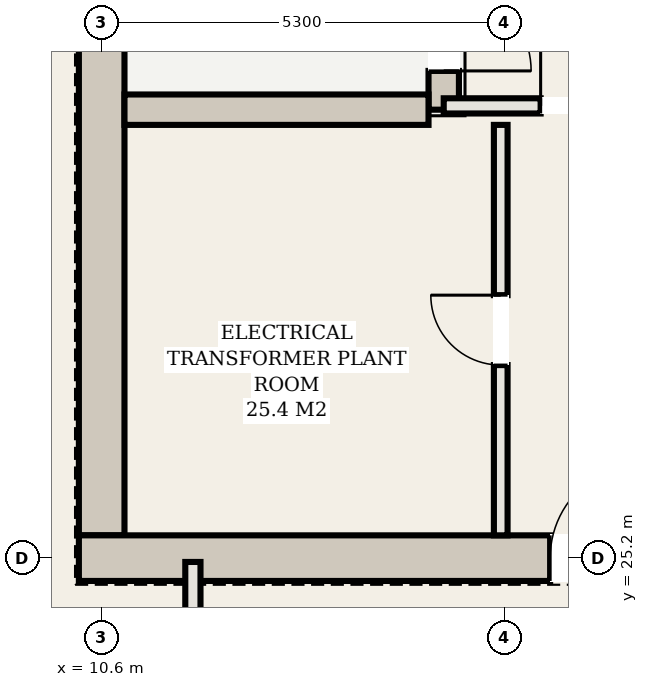
"""IFC4 building model, lengths in metres.
Left out: names, types, materials, properties, quantities, classifications, styles, units other than length and angle.
Written with IfcOpenShell. Run it as: python <this file> out.ifc"""

import sys

from ifc_helpers import new_model, si_unit, direction, frame, frame_2d, origin, place, context, subcontext, project, spatial, rectangle, extrude, element, fill, save


model = new_model("IFC4")
c1 = context("Model", 3, precision=1e-05, world=origin(), true_north=direction((0.0, 1.0)))
c2 = subcontext(c1, "Body", "Model", "MODEL_VIEW")
j1 = project(units=[si_unit("LENGTHUNIT", "METRE"), si_unit("PLANEANGLEUNIT", "RADIAN")], contexts=[c1])
p1 = place(None, origin())
s1 = spatial("IfcSite", under=j1, at=p1, CompositionType="ELEMENT")
p2 = place(p1, origin())
s2 = spatial("IfcBuilding", under=s1, at=p2, CompositionType="ELEMENT")
p3 = place(p2, frame((0.0, 0.0, 185.4)))
s3 = spatial("IfcBuildingStorey", under=s2, at=p3, CompositionType="ELEMENT", Elevation=185.4)
p4 = place(p3, frame((10.6, 25.5, 0.0), z_axis=(0.0, 0.0, 1.0), x_axis=(0.0, 1.0, 0.0)))
e1 = element("IfcWall", 1, at=p4, inside=s3, PredefinedType="SHEAR", context=c2, shape_type="SweptSolid", body=[
    extrude(rectangle(XDim=14.2, YDim=0.6, at=frame_2d((7.1, 0.0))), origin(), (0.0, 0.0, 1.0), 6.56),
])
p5 = place(p3, frame((10.3, 25.2, 0.0), z_axis=(0.0, 0.0, 1.0), x_axis=(1.0, 0.0, 0.0)))
e2 = element("IfcWall", 2, at=p5, inside=s3, PredefinedType="SHEAR", context=c2, shape_type="SweptSolid", body=[
    extrude(rectangle(XDim=8.1, YDim=0.6, at=frame_2d((4.05, 0.0))), origin(), (0.0, 0.0, 1.0), 6.56),
])
p6 = place(p5, frame((6.2, 0.0, 0.0)))
e3 = element("IfcOpeningElement", 3, at=p6, cuts=e2, PredefinedType="OPENING", context=c2, shape_type="SweptSolid", body=[
    extrude(rectangle(XDim=1.25, YDim=2.2, at=frame_2d((0.625, 1.1))), frame((0.0, 0.31, 0.0), z_axis=(0.0, -1.0, 0.0), x_axis=(1.0, 0.0, 0.0)), (0.0, 0.0, 1.0), 0.62),
])
p7 = place(p3, frame((15.1, 31.1, 0.0), z_axis=(0.0, 0.0, 1.0), x_axis=(0.0, 1.0, 0.0)))
e4 = element("IfcWall", 4, at=p7, inside=s3, PredefinedType="SHEAR", context=c2, shape_type="SweptSolid", body=[
    extrude(rectangle(XDim=8.6, YDim=0.4, at=frame_2d((4.3, 0.0))), origin(), (0.0, 0.0, 1.0), 6.56),
])
p8 = place(p7, frame((0.51, 0.0, 0.0)))
e5 = element("IfcOpeningElement", 5, at=p8, cuts=e4, PredefinedType="OPENING", context=c2, shape_type="SweptSolid", body=[
    extrude(rectangle(XDim=1.15, YDim=2.2, at=frame_2d((0.575, 1.1))), frame((0.0, 0.21, 0.0), z_axis=(0.0, -1.0, 0.0), x_axis=(1.0, 0.0, 0.0)), (0.0, 0.0, 1.0), 0.42),
])
p9 = place(p3, frame((10.9, 31.1, 0.0), z_axis=(0.0, 0.0, 1.0), x_axis=(1.0, 0.0, 0.0)))
e6 = element("IfcWall", 6, at=p9, inside=s3, PredefinedType="SHEAR", context=c2, shape_type="SweptSolid", body=[
    extrude(rectangle(XDim=4.0, YDim=0.4, at=frame_2d((2.0, 0.0))), origin(), (0.0, 0.0, 1.0), 6.56),
])
p10 = place(p3, frame((15.1, 31.15, 0.0), z_axis=(0.0, 0.0, 1.0), x_axis=(1.0, 0.0, 0.0)))
e7 = element("IfcWall", 7, at=p10, inside=s3, PredefinedType="PARTITIONING", context=c2, shape_type="SweptSolid", body=[
    extrude(rectangle(XDim=3.25, YDim=0.2, at=frame_2d((1.625, 0.0))), origin(), (0.0, 0.0, 1.0), 6.56),
])
p11 = place(p10, frame((1.275, 0.0, 0.0)))
e8 = element("IfcOpeningElement", 8, at=p11, cuts=e7, PredefinedType="OPENING", context=c2, shape_type="SweptSolid", body=[
    extrude(rectangle(XDim=1.25, YDim=2.2, at=frame_2d((0.625, 1.1))), frame((0.0, 0.11, 0.0), z_axis=(0.0, -1.0, 0.0), x_axis=(1.0, 0.0, 0.0)), (0.0, 0.0, 1.0), 0.22),
])
p12 = place(p3, frame((15.85, 25.5, 0.0), z_axis=(0.0, 0.0, 1.0), x_axis=(0.0, 1.0, 0.0)))
e9 = element("IfcWall", 9, at=p12, inside=s3, PredefinedType="PARTITIONING", context=c2, shape_type="SweptSolid", body=[
    extrude(rectangle(XDim=5.4, YDim=0.18, at=frame_2d((2.7, 0.0))), origin(), (0.0, 0.0, 1.0), 5.055),
])
p13 = place(p12, frame((2.24, 0.0, 0.0)))
e10 = element("IfcOpeningElement", 10, at=p13, cuts=e9, PredefinedType="OPENING", context=c2, shape_type="SweptSolid", body=[
    extrude(rectangle(XDim=0.92, YDim=2.15, at=frame_2d((0.46, 1.075))), frame((0.0, 0.1, 0.0), z_axis=(0.0, -1.0, 0.0), x_axis=(1.0, 0.0, 0.0)), (0.0, 0.0, 1.0), 0.2),
])
p14 = place(p3, frame((11.8, 22.4, 0.0), z_axis=(0.0, 0.0, 1.0), x_axis=(0.0, 1.0, 0.0)))
e11 = element("IfcWall", 11, at=p14, inside=s3, PredefinedType="PARTITIONING", context=c2, shape_type="SweptSolid", body=[
    extrude(rectangle(XDim=2.75, YDim=0.2, at=frame_2d((1.375, 0.0))), origin(), (0.0, 0.0, 1.0), 6.56),
])
p15 = place(p6, origin())
e12 = element("IfcDoor", 12, at=p15, inside=s3, OperationType="SINGLE_SWING_RIGHT", PredefinedType="DOOR", context=c2, shape_type="SweptSolid", body=[
    extrude(rectangle(XDim=1.25, YDim=2.2, at=frame_2d((0.625, 1.1))), frame((0.0, 0.025, 0.0), z_axis=(0.0, -1.0, 0.0), x_axis=(1.0, 0.0, 0.0)), (0.0, 0.0, 1.0), 0.05),
])
fill(e3, e12)
p16 = place(p11, origin())
e13 = element("IfcDoor", 13, at=p16, inside=s3, OperationType="SINGLE_SWING_LEFT", PredefinedType="DOOR", context=c2, shape_type="SweptSolid", body=[
    extrude(rectangle(XDim=1.25, YDim=2.2, at=frame_2d((0.625, 1.1))), frame((0.0, 0.025, 0.0), z_axis=(0.0, -1.0, 0.0), x_axis=(1.0, 0.0, 0.0)), (0.0, 0.0, 1.0), 0.05),
])
fill(e8, e13)
p17 = place(p8, frame((1.15, 0.0, 0.0), z_axis=(0.0, 0.0, 1.0), x_axis=(-1.0, 0.0, 0.0)))
e14 = element("IfcDoor", 14, at=p17, inside=s3, OperationType="SINGLE_SWING_RIGHT", PredefinedType="DOOR", context=c2, shape_type="SweptSolid", body=[
    extrude(rectangle(XDim=1.15, YDim=2.2, at=frame_2d((0.575, 1.1))), frame((0.0, 0.025, 0.0), z_axis=(0.0, -1.0, 0.0), x_axis=(1.0, 0.0, 0.0)), (0.0, 0.0, 1.0), 0.05),
])
fill(e5, e14)
p18 = place(p13, origin())
e15 = element("IfcDoor", 15, at=p18, inside=s3, OperationType="SINGLE_SWING_RIGHT", PredefinedType="DOOR", context=c2, shape_type="SweptSolid", body=[
    extrude(rectangle(XDim=0.92, YDim=2.15, at=frame_2d((0.46, 1.075))), frame((0.0, 0.025, 0.0), z_axis=(0.0, -1.0, 0.0), x_axis=(1.0, 0.0, 0.0)), (0.0, 0.0, 1.0), 0.05),
])
fill(e10, e15)
save(model, sys.argv[1])
